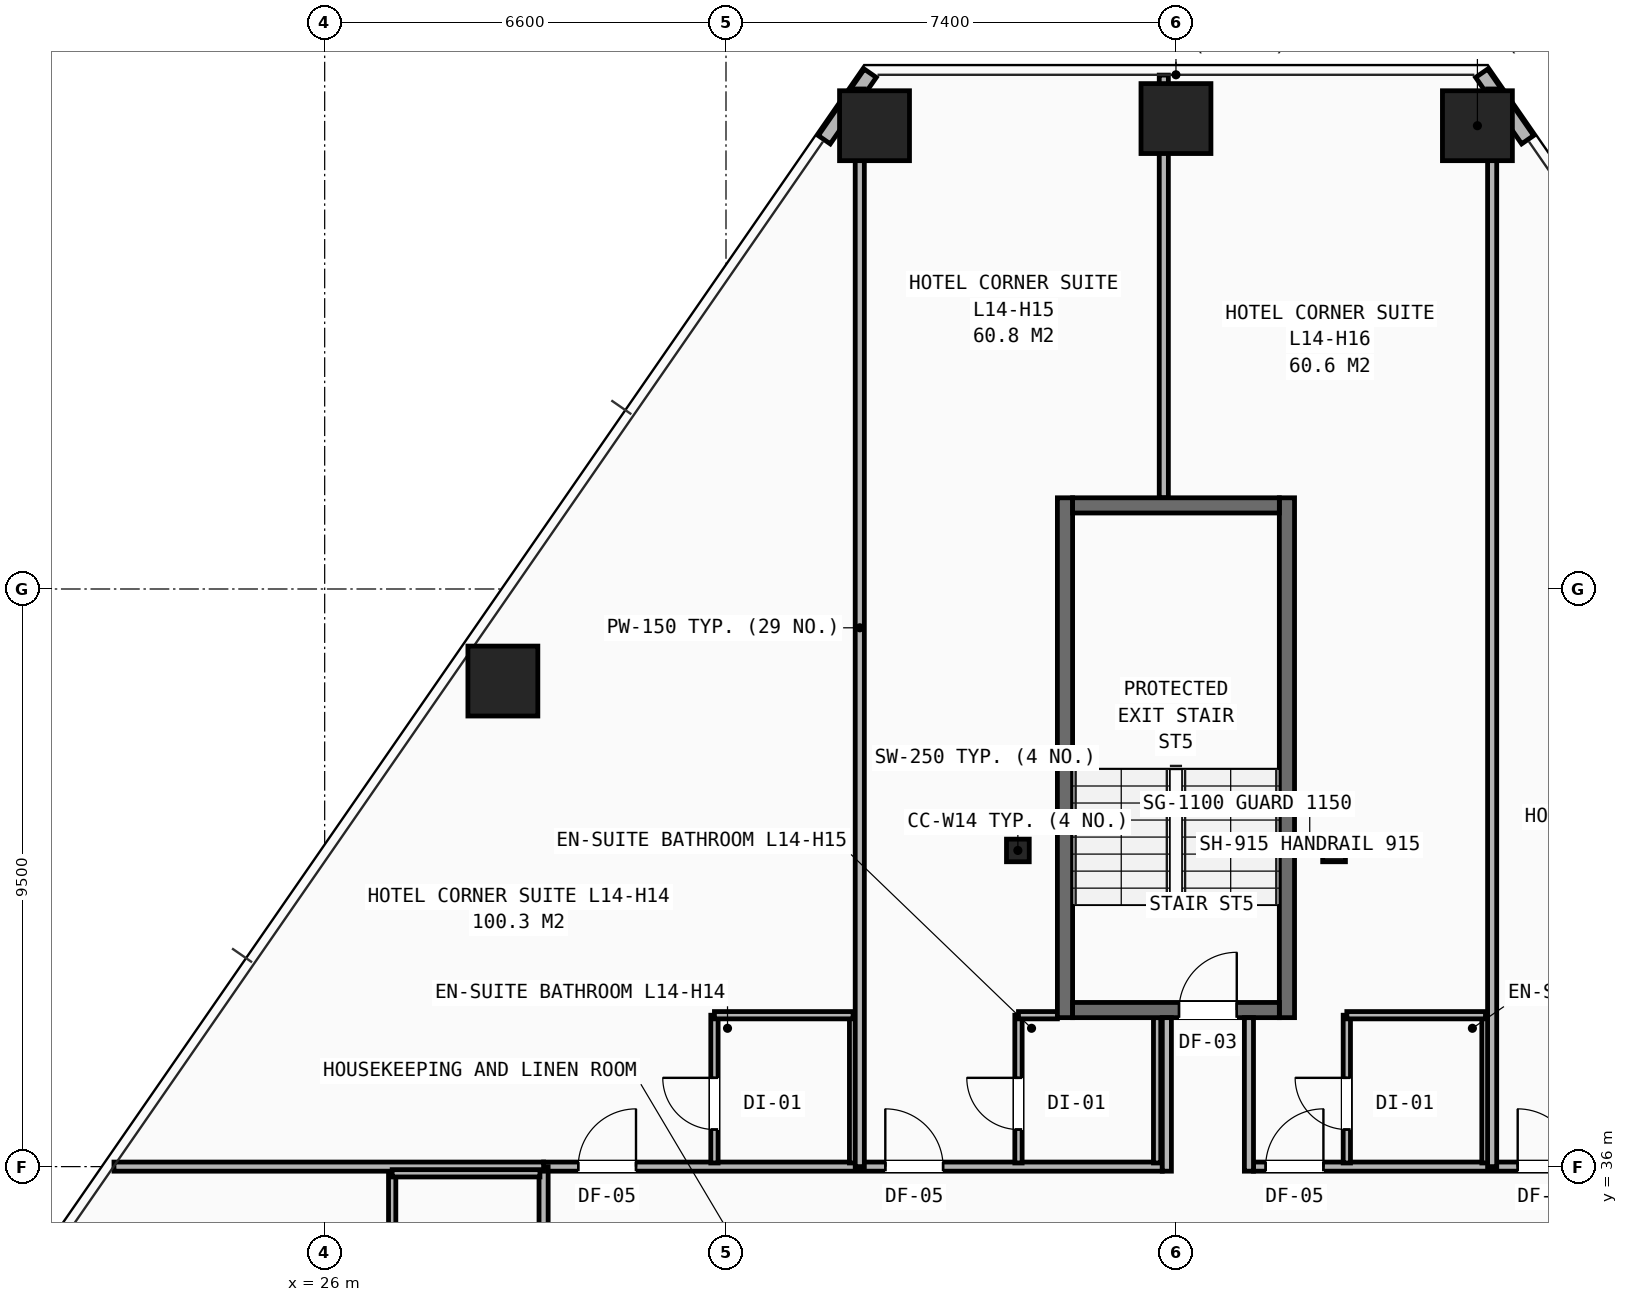
"""IFC4 building model, lengths in metres.
Left out: names, types, materials, properties, quantities, classifications, styles, units other than length and angle.
Written with IfcOpenShell. Run it as: python <this file> out.ifc"""

import sys

from ifc_helpers import new_model, si_unit, direction, frame, frame_2d, origin, origin_2d, place, context, subcontext, project, spatial, rectangle, hollow_rectangle, i_section, extrude, element, fill, save


model = new_model("IFC4")
c1 = context("Model", 3, precision=1e-05, world=origin(), true_north=direction((0.0, 1.0)))
c2 = subcontext(c1, "Body", "Model", "MODEL_VIEW")
j1 = project(units=[si_unit("LENGTHUNIT", "METRE"), si_unit("PLANEANGLEUNIT", "RADIAN")], contexts=[c1])
p1 = place(None, origin())
s1 = spatial("IfcSite", under=j1, at=p1, CompositionType="ELEMENT")
p2 = place(p1, origin())
s2 = spatial("IfcBuilding", under=s1, at=p2, CompositionType="ELEMENT")
p3 = place(p2, frame((0.0, 0.0, 52.8)))
s3 = spatial("IfcBuildingStorey", under=s2, at=p3, CompositionType="ELEMENT", Elevation=52.8)
for number, where, z_axis, x_axis in (
    (1, (37.4, 41.2, 0.0), (0.0, 0.0, 1.0), (1.0, 0.0, 0.0)),
    (2, (42.6, 41.2, 0.0), (0.0, 0.0, 1.0), (1.0, 0.0, 0.0)),
):
    element("IfcColumn", number, at=place(p3, frame(where, z_axis=z_axis, x_axis=x_axis)), inside=s3, PredefinedType="COLUMN", context=c2, shape_type="SweptSolid", body=[
        extrude(i_section(OverallWidth=0.374, OverallDepth=0.372, WebThickness=0.016, FlangeThickness=0.026, at=origin_2d()), origin(), (0.0, 0.0, 1.0), 3.2),
    ])
for number, where, z_axis, x_axis in (
    (3, (44.958, 53.12, 0.0), (0.0, 0.0, 1.0), (1.0, 0.0, 0.0)),
    (4, (40.0, 53.237, 0.0), (0.0, 0.0, 1.0), (1.0, 0.0, 0.0)),
    (5, (35.042, 53.12, 0.0), (0.0, 0.0, 1.0), (1.0, 0.0, 0.0)),
    (6, (28.931, 43.986, 0.0), (0.0, 0.0, 1.0), (1.0, 0.0, 0.0)),
):
    element("IfcColumn", number, at=place(p3, frame(where, z_axis=z_axis, x_axis=x_axis)), inside=s3, PredefinedType="COLUMN", context=c2, shape_type="SweptSolid", body=[
        extrude(hollow_rectangle(XDim=1.15, YDim=1.15, WallThickness=0.075, at=origin_2d()), origin(), (0.0, 0.0, 1.0), 3.2),
    ])
for number, where, z_axis, x_axis in (
    (7, (34.973, 53.982, 0.0), (0.0, 0.0, 1.0), (-0.569, -0.822, 0.0)),
    (8, (45.784, 52.889, 0.0), (0.0, 0.0, 1.0), (-0.569, 0.822, 0.0)),
):
    element("IfcWall", number, at=place(p3, frame(where, z_axis=z_axis, x_axis=x_axis)), inside=s3, PredefinedType="SHEAR", context=c2, shape_type="SweptSolid", body=[
        extrude(rectangle(XDim=1.33, YDim=0.24, at=frame_2d((0.665, 0.0))), origin(), (0.0, 0.0, 1.0), 2.263),
    ])
p4 = place(p3, frame((29.6, 36.0, 0.0), z_axis=(0.0, 0.0, 1.0), x_axis=(1.0, 0.0, 0.0)))
e9 = element("IfcWall", 9, at=p4, inside=s3, PredefinedType="PARTITIONING", context=c2, shape_type="SweptSolid", body=[
    extrude(rectangle(XDim=10.175, YDim=0.15, at=frame_2d((5.087, 0.0))), origin(), (0.0, 0.0, 1.0), 2.98),
])
p5 = place(p4, frame((0.57, 0.0, 0.0)))
e10 = element("IfcOpeningElement", 10, at=p5, cuts=e9, PredefinedType="OPENING", context=c2, shape_type="SweptSolid", body=[
    extrude(rectangle(XDim=0.95, YDim=2.1, at=frame_2d((0.475, 1.05))), frame((0.0, 0.085, 0.0), z_axis=(0.0, -1.0, 0.0), x_axis=(1.0, 0.0, 0.0)), (0.0, 0.0, 1.0), 0.17),
])
p6 = place(p4, frame((5.62, 0.0, 0.0)))
e11 = element("IfcOpeningElement", 11, at=p6, cuts=e9, PredefinedType="OPENING", context=c2, shape_type="SweptSolid", body=[
    extrude(rectangle(XDim=0.95, YDim=2.1, at=frame_2d((0.475, 1.05))), frame((0.0, 0.085, 0.0), z_axis=(0.0, -1.0, 0.0), x_axis=(1.0, 0.0, 0.0)), (0.0, 0.0, 1.0), 0.17),
])
p7 = place(p3, frame((41.275, 36.0, 0.0), z_axis=(0.0, 0.0, 1.0), x_axis=(1.0, 0.0, 0.0)))
e12 = element("IfcWall", 12, at=p7, inside=s3, PredefinedType="PARTITIONING", context=c2, shape_type="SweptSolid", body=[
    extrude(rectangle(XDim=9.125, YDim=0.15, at=frame_2d((4.562, 0.0))), origin(), (0.0, 0.0, 1.0), 2.513),
])
p8 = place(p7, frame((0.2, 0.0, 0.0)))
e13 = element("IfcOpeningElement", 13, at=p8, cuts=e12, PredefinedType="OPENING", context=c2, shape_type="SweptSolid", body=[
    extrude(rectangle(XDim=0.95, YDim=2.1, at=frame_2d((0.475, 1.05))), frame((0.0, 0.085, 0.0), z_axis=(0.0, -1.0, 0.0), x_axis=(1.0, 0.0, 0.0)), (0.0, 0.0, 1.0), 0.17),
])
p9 = place(p7, frame((4.345, 0.0, 0.0)))
e14 = element("IfcOpeningElement", 14, at=p9, cuts=e12, PredefinedType="OPENING", context=c2, shape_type="SweptSolid", body=[
    extrude(rectangle(XDim=0.95, YDim=2.1, at=frame_2d((0.475, 1.05))), frame((0.0, 0.085, 0.0), z_axis=(0.0, -1.0, 0.0), x_axis=(1.0, 0.0, 0.0)), (0.0, 0.0, 1.0), 0.17),
])
p10 = place(p3, frame((29.6, 14.1, 0.0), z_axis=(0.0, 0.0, 1.0), x_axis=(0.0, 1.0, 0.0)))
e15 = element("IfcWall", 15, at=p10, inside=s3, PredefinedType="PARTITIONING", context=c2, shape_type="SweptSolid", body=[
    extrude(rectangle(XDim=21.9, YDim=0.15, at=frame_2d((10.95, 0.0))), origin(), (0.0, 0.0, 1.0), 2.191),
])
p11 = place(p10, frame((0.42, 0.0, 0.0)))
e16 = element("IfcOpeningElement", 16, at=p11, cuts=e15, PredefinedType="OPENING", context=c2, shape_type="SweptSolid", body=[
    extrude(rectangle(XDim=0.95, YDim=2.1, at=frame_2d((0.475, 1.05))), frame((0.0, 0.085, 0.0), z_axis=(0.0, -1.0, 0.0), x_axis=(1.0, 0.0, 0.0)), (0.0, 0.0, 1.0), 0.17),
])
p12 = place(p10, frame((5.12, 0.0, 0.0)))
e17 = element("IfcOpeningElement", 17, at=p12, cuts=e15, PredefinedType="OPENING", context=c2, shape_type="SweptSolid", body=[
    extrude(rectangle(XDim=0.95, YDim=2.1, at=frame_2d((0.475, 1.05))), frame((0.0, 0.085, 0.0), z_axis=(0.0, -1.0, 0.0), x_axis=(1.0, 0.0, 0.0)), (0.0, 0.0, 1.0), 0.17),
])
p13 = place(p10, frame((10.12, 0.0, 0.0)))
e18 = element("IfcOpeningElement", 18, at=p13, cuts=e15, PredefinedType="OPENING", context=c2, shape_type="SweptSolid", body=[
    extrude(rectangle(XDim=0.95, YDim=2.1, at=frame_2d((0.475, 1.05))), frame((0.0, 0.085, 0.0), z_axis=(0.0, -1.0, 0.0), x_axis=(1.0, 0.0, 0.0)), (0.0, 0.0, 1.0), 0.17),
])
p14 = place(p10, frame((16.12, 0.0, 0.0)))
e19 = element("IfcOpeningElement", 19, at=p14, cuts=e15, PredefinedType="OPENING", context=c2, shape_type="SweptSolid", body=[
    extrude(rectangle(XDim=0.95, YDim=2.1, at=frame_2d((0.475, 1.05))), frame((0.0, 0.085, 0.0), z_axis=(0.0, -1.0, 0.0), x_axis=(1.0, 0.0, 0.0)), (0.0, 0.0, 1.0), 0.17),
])
p15 = place(p3, frame((22.535, 36.0, 0.0), z_axis=(0.0, 0.0, 1.0), x_axis=(1.0, 0.0, 0.0)))
e20 = element("IfcWall", 20, at=p15, inside=s3, PredefinedType="PARTITIONING", context=c2, shape_type="SweptSolid", body=[
    extrude(rectangle(XDim=7.065, YDim=0.15, at=frame_2d((3.533, 0.0))), origin(), (0.0, 0.0, 1.0), 2.268),
])
p16 = place(p3, frame((27.11, 33.61, 0.0), z_axis=(0.0, 0.0, 1.0), x_axis=(0.0, 1.0, 0.0)))
e21 = element("IfcWall", 21, at=p16, inside=s3, PredefinedType="PARTITIONING", context=c2, shape_type="SweptSolid", body=[
    extrude(rectangle(XDim=2.28, YDim=0.12, at=frame_2d((1.14, 0.0))), origin(), (0.0, 0.0, 1.0), 2.513),
])
p17 = place(p3, frame((27.11, 35.89, 0.0), z_axis=(0.0, 0.0, 1.0), x_axis=(1.0, 0.0, 0.0)))
e22 = element("IfcWall", 22, at=p17, inside=s3, PredefinedType="PARTITIONING", context=c2, shape_type="SweptSolid", body=[
    extrude(rectangle(XDim=2.43, YDim=0.12, at=frame_2d((1.215, 0.0))), origin(), (0.0, 0.0, 1.0), 2.513),
])
p18 = place(p3, frame((32.41, 36.06, 0.0), z_axis=(0.0, 0.0, 1.0), x_axis=(0.0, 1.0, 0.0)))
e23 = element("IfcWall", 23, at=p18, inside=s3, PredefinedType="PARTITIONING", context=c2, shape_type="SweptSolid", body=[
    extrude(rectangle(XDim=2.43, YDim=0.12, at=frame_2d((1.215, 0.0))), origin(), (0.0, 0.0, 1.0), 2.98),
])
p19 = place(p18, frame((0.55, 0.0, 0.0)))
e24 = element("IfcOpeningElement", 24, at=p19, cuts=e23, PredefinedType="OPENING", context=c2, shape_type="SweptSolid", body=[
    extrude(rectangle(XDim=0.85, YDim=2.05, at=frame_2d((0.425, 1.025))), frame((0.0, 0.07, 0.0), z_axis=(0.0, -1.0, 0.0), x_axis=(1.0, 0.0, 0.0)), (0.0, 0.0, 1.0), 0.14),
])
p20 = place(p3, frame((34.69, 36.06, 0.0), z_axis=(0.0, 0.0, 1.0), x_axis=(0.0, 1.0, 0.0)))
e25 = element("IfcWall", 25, at=p20, inside=s3, PredefinedType="PARTITIONING", context=c2, shape_type="SweptSolid", body=[
    extrude(rectangle(XDim=2.43, YDim=0.12, at=frame_2d((1.215, 0.0))), origin(), (0.0, 0.0, 1.0), 2.98),
])
p21 = place(p3, frame((32.41, 38.49, 0.0), z_axis=(0.0, 0.0, 1.0), x_axis=(1.0, 0.0, 0.0)))
e26 = element("IfcWall", 26, at=p21, inside=s3, PredefinedType="PARTITIONING", context=c2, shape_type="SweptSolid", body=[
    extrude(rectangle(XDim=2.28, YDim=0.12, at=frame_2d((1.14, 0.0))), origin(), (0.0, 0.0, 1.0), 2.98),
])
p22 = place(p3, frame((34.8, 36.0, 0.0), z_axis=(0.0, 0.0, 1.0), x_axis=(0.0, 1.0, 0.0)))
e27 = element("IfcWall", 27, at=p22, inside=s3, PredefinedType="PARTITIONING", context=c2, shape_type="SweptSolid", body=[
    extrude(rectangle(XDim=17.724, YDim=0.15, at=frame_2d((8.862, 0.0))), origin(), (0.0, 0.0, 1.0), 2.191),
])
p23 = place(p3, frame((37.41, 36.06, 0.0), z_axis=(0.0, 0.0, 1.0), x_axis=(0.0, 1.0, 0.0)))
e28 = element("IfcWall", 28, at=p23, inside=s3, PredefinedType="PARTITIONING", context=c2, shape_type="SweptSolid", body=[
    extrude(rectangle(XDim=2.43, YDim=0.12, at=frame_2d((1.215, 0.0))), origin(), (0.0, 0.0, 1.0), 2.98),
])
p24 = place(p23, frame((0.55, 0.0, 0.0)))
e29 = element("IfcOpeningElement", 29, at=p24, cuts=e28, PredefinedType="OPENING", context=c2, shape_type="SweptSolid", body=[
    extrude(rectangle(XDim=0.85, YDim=2.05, at=frame_2d((0.425, 1.025))), frame((0.0, 0.07, 0.0), z_axis=(0.0, -1.0, 0.0), x_axis=(1.0, 0.0, 0.0)), (0.0, 0.0, 1.0), 0.14),
])
p25 = place(p3, frame((39.69, 36.06, 0.0), z_axis=(0.0, 0.0, 1.0), x_axis=(0.0, 1.0, 0.0)))
e30 = element("IfcWall", 30, at=p25, inside=s3, PredefinedType="PARTITIONING", context=c2, shape_type="SweptSolid", body=[
    extrude(rectangle(XDim=2.39, YDim=0.12, at=frame_2d((1.195, 0.0))), origin(), (0.0, 0.0, 1.0), 2.98),
])
p26 = place(p3, frame((37.41, 38.49, 0.0), z_axis=(0.0, 0.0, 1.0), x_axis=(1.0, 0.0, 0.0)))
e31 = element("IfcWall", 31, at=p26, inside=s3, PredefinedType="PARTITIONING", context=c2, shape_type="SweptSolid", body=[
    extrude(rectangle(XDim=0.64, YDim=0.12, at=frame_2d((0.32, 0.0))), origin(), (0.0, 0.0, 1.0), 2.98),
])
p27 = place(p3, frame((39.8, 47.0, 0.0), z_axis=(0.0, 0.0, 1.0), x_axis=(0.0, 1.0, 0.0)))
e32 = element("IfcWall", 32, at=p27, inside=s3, PredefinedType="PARTITIONING", context=c2, shape_type="SweptSolid", body=[
    extrude(rectangle(XDim=6.952, YDim=0.15, at=frame_2d((3.476, 0.0))), origin(), (0.0, 0.0, 1.0), 2.268),
])
p28 = place(p3, frame((42.81, 36.06, 0.0), z_axis=(0.0, 0.0, 1.0), x_axis=(0.0, 1.0, 0.0)))
e33 = element("IfcWall", 33, at=p28, inside=s3, PredefinedType="PARTITIONING", context=c2, shape_type="SweptSolid", body=[
    extrude(rectangle(XDim=2.43, YDim=0.12, at=frame_2d((1.215, 0.0))), origin(), (0.0, 0.0, 1.0), 2.98),
])
p29 = place(p28, frame((0.55, 0.0, 0.0)))
e34 = element("IfcOpeningElement", 34, at=p29, cuts=e33, PredefinedType="OPENING", context=c2, shape_type="SweptSolid", body=[
    extrude(rectangle(XDim=0.85, YDim=2.05, at=frame_2d((0.425, 1.025))), frame((0.0, 0.07, 0.0), z_axis=(0.0, -1.0, 0.0), x_axis=(1.0, 0.0, 0.0)), (0.0, 0.0, 1.0), 0.14),
])
p30 = place(p3, frame((45.09, 36.06, 0.0), z_axis=(0.0, 0.0, 1.0), x_axis=(0.0, 1.0, 0.0)))
e35 = element("IfcWall", 35, at=p30, inside=s3, PredefinedType="PARTITIONING", context=c2, shape_type="SweptSolid", body=[
    extrude(rectangle(XDim=2.43, YDim=0.12, at=frame_2d((1.215, 0.0))), origin(), (0.0, 0.0, 1.0), 2.98),
])
p31 = place(p3, frame((42.81, 38.49, 0.0), z_axis=(0.0, 0.0, 1.0), x_axis=(1.0, 0.0, 0.0)))
e36 = element("IfcWall", 36, at=p31, inside=s3, PredefinedType="PARTITIONING", context=c2, shape_type="SweptSolid", body=[
    extrude(rectangle(XDim=2.28, YDim=0.12, at=frame_2d((1.14, 0.0))), origin(), (0.0, 0.0, 1.0), 2.98),
])
p32 = place(p3, frame((45.2, 36.0, 0.0), z_axis=(0.0, 0.0, 1.0), x_axis=(0.0, 1.0, 0.0)))
e37 = element("IfcWall", 37, at=p32, inside=s3, PredefinedType="PARTITIONING", context=c2, shape_type="SweptSolid", body=[
    extrude(rectangle(XDim=17.724, YDim=0.15, at=frame_2d((8.862, 0.0))), origin(), (0.0, 0.0, 1.0), 2.191),
])
for number, where, z_axis, x_axis in (
    (38, (38.175, 38.45, 0.0), (0.0, 0.0, 1.0), (0.0, 1.0, 0.0)),
    (39, (41.825, 38.45, 0.0), (0.0, 0.0, 1.0), (0.0, 1.0, 0.0)),
):
    element("IfcWall", number, at=place(p3, frame(where, z_axis=z_axis, x_axis=x_axis)), inside=s3, PredefinedType="SHEAR", context=c2, shape_type="SweptSolid", body=[
        extrude(rectangle(XDim=8.55, YDim=0.25, at=frame_2d((4.275, 0.0))), origin(), (0.0, 0.0, 1.0), 2.98),
    ])
p33 = place(p3, frame((38.3, 38.575, 0.0), z_axis=(0.0, 0.0, 1.0), x_axis=(1.0, 0.0, 0.0)))
e40 = element("IfcWall", 40, at=p33, inside=s3, PredefinedType="SHEAR", context=c2, shape_type="SweptSolid", body=[
    extrude(rectangle(XDim=3.4, YDim=0.25, at=frame_2d((1.7, 0.0))), origin(), (0.0, 0.0, 1.0), 2.98),
])
p34 = place(p33, frame((1.75, 0.0, 0.0)))
e41 = element("IfcOpeningElement", 41, at=p34, cuts=e40, PredefinedType="OPENING", context=c2, shape_type="SweptSolid", body=[
    extrude(rectangle(XDim=0.95, YDim=2.1, at=frame_2d((0.475, 1.05))), frame((0.0, 0.135, 0.0), z_axis=(0.0, -1.0, 0.0), x_axis=(1.0, 0.0, 0.0)), (0.0, 0.0, 1.0), 0.27),
])
p35 = place(p3, frame((38.3, 46.875, 0.0), z_axis=(0.0, 0.0, 1.0), x_axis=(1.0, 0.0, 0.0)))
e42 = element("IfcWall", 42, at=p35, inside=s3, PredefinedType="SHEAR", context=c2, shape_type="SweptSolid", body=[
    extrude(rectangle(XDim=3.4, YDim=0.25, at=frame_2d((1.7, 0.0))), origin(), (0.0, 0.0, 1.0), 2.98),
])
for number, where, z_axis, x_axis in (
    (43, (39.85, 35.925, 0.0), (0.0, 0.0, 1.0), (0.0, 1.0, 0.0)),
    (44, (41.2, 35.925, 0.0), (0.0, 0.0, 1.0), (0.0, 1.0, 0.0)),
):
    element("IfcWall", number, at=place(p3, frame(where, z_axis=z_axis, x_axis=x_axis)), inside=s3, PredefinedType="PARTITIONING", context=c2, shape_type="SweptSolid", body=[
        extrude(rectangle(XDim=2.525, YDim=0.15, at=frame_2d((1.262, 0.0))), origin(), (0.0, 0.0, 1.0), 2.98),
    ])
p36 = place(p5, origin())
e45 = element("IfcDoor", 45, at=p36, inside=s3, OperationType="SINGLE_SWING_RIGHT", PredefinedType="DOOR", context=c2, shape_type="SweptSolid", body=[
    extrude(rectangle(XDim=0.95, YDim=2.1, at=frame_2d((0.475, 1.05))), frame((0.0, 0.025, 0.0), z_axis=(0.0, -1.0, 0.0), x_axis=(1.0, 0.0, 0.0)), (0.0, 0.0, 1.0), 0.05),
])
fill(e10, e45)
p37 = place(p19, origin())
e46 = element("IfcDoor", 46, at=p37, inside=s3, OperationType="SINGLE_SWING_RIGHT", PredefinedType="DOOR", context=c2, shape_type="SweptSolid", body=[
    extrude(rectangle(XDim=0.85, YDim=2.05, at=frame_2d((0.425, 1.025))), frame((0.0, 0.025, 0.0), z_axis=(0.0, -1.0, 0.0), x_axis=(1.0, 0.0, 0.0)), (0.0, 0.0, 1.0), 0.05),
])
fill(e24, e46)
p38 = place(p6, origin())
e47 = element("IfcDoor", 47, at=p38, inside=s3, OperationType="SINGLE_SWING_LEFT", PredefinedType="DOOR", context=c2, shape_type="SweptSolid", body=[
    extrude(rectangle(XDim=0.95, YDim=2.1, at=frame_2d((0.475, 1.05))), frame((0.0, 0.025, 0.0), z_axis=(0.0, -1.0, 0.0), x_axis=(1.0, 0.0, 0.0)), (0.0, 0.0, 1.0), 0.05),
])
fill(e11, e47)
p39 = place(p24, origin())
e48 = element("IfcDoor", 48, at=p39, inside=s3, OperationType="SINGLE_SWING_RIGHT", PredefinedType="DOOR", context=c2, shape_type="SweptSolid", body=[
    extrude(rectangle(XDim=0.85, YDim=2.05, at=frame_2d((0.425, 1.025))), frame((0.0, 0.025, 0.0), z_axis=(0.0, -1.0, 0.0), x_axis=(1.0, 0.0, 0.0)), (0.0, 0.0, 1.0), 0.05),
])
fill(e29, e48)
p40 = place(p8, origin())
e49 = element("IfcDoor", 49, at=p40, inside=s3, OperationType="SINGLE_SWING_RIGHT", PredefinedType="DOOR", context=c2, shape_type="SweptSolid", body=[
    extrude(rectangle(XDim=0.95, YDim=2.1, at=frame_2d((0.475, 1.05))), frame((0.0, 0.025, 0.0), z_axis=(0.0, -1.0, 0.0), x_axis=(1.0, 0.0, 0.0)), (0.0, 0.0, 1.0), 0.05),
])
fill(e13, e49)
p41 = place(p29, origin())
e50 = element("IfcDoor", 50, at=p41, inside=s3, OperationType="SINGLE_SWING_RIGHT", PredefinedType="DOOR", context=c2, shape_type="SweptSolid", body=[
    extrude(rectangle(XDim=0.85, YDim=2.05, at=frame_2d((0.425, 1.025))), frame((0.0, 0.025, 0.0), z_axis=(0.0, -1.0, 0.0), x_axis=(1.0, 0.0, 0.0)), (0.0, 0.0, 1.0), 0.05),
])
fill(e34, e50)
p42 = place(p9, origin())
e51 = element("IfcDoor", 51, at=p42, inside=s3, OperationType="SINGLE_SWING_LEFT", PredefinedType="DOOR", context=c2, shape_type="SweptSolid", body=[
    extrude(rectangle(XDim=0.95, YDim=2.1, at=frame_2d((0.475, 1.05))), frame((0.0, 0.025, 0.0), z_axis=(0.0, -1.0, 0.0), x_axis=(1.0, 0.0, 0.0)), (0.0, 0.0, 1.0), 0.05),
])
fill(e14, e51)
p43 = place(p34, origin())
e52 = element("IfcDoor", 52, at=p43, inside=s3, OperationType="SINGLE_SWING_RIGHT", PredefinedType="DOOR", context=c2, shape_type="SweptSolid", body=[
    extrude(rectangle(XDim=0.95, YDim=2.1, at=frame_2d((0.475, 1.05))), frame((0.0, 0.025, 0.0), z_axis=(0.0, -1.0, 0.0), x_axis=(1.0, 0.0, 0.0)), (0.0, 0.0, 1.0), 0.05),
])
fill(e41, e52)
save(model, sys.argv[1])
